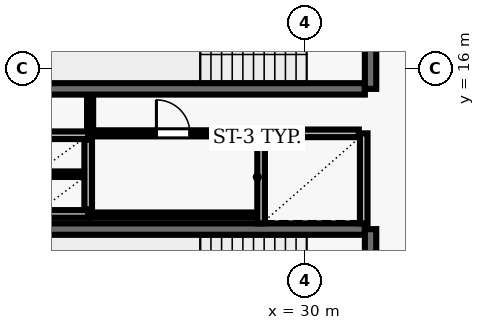
"""IFC4 building model, lengths in metres.
Left out: names, types, materials, properties, quantities, classifications, styles, units other than length and angle.
Written with IfcOpenShell. Run it as: python <this file> out.ifc"""

import sys

from ifc_helpers import new_model, si_unit, direction, frame, frame_2d, origin, place, context, subcontext, project, spatial, rectangle, extrude, element, fill, save


model = new_model("IFC4")
c1 = context("Model", 3, precision=1e-05, world=origin(), true_north=direction((0.0, 1.0)))
c2 = subcontext(c1, "Body", "Model", "MODEL_VIEW")
j1 = project(units=[si_unit("LENGTHUNIT", "METRE"), si_unit("PLANEANGLEUNIT", "RADIAN")], contexts=[c1])
p1 = place(None, origin())
s1 = spatial("IfcSite", under=j1, at=p1, CompositionType="ELEMENT")
p2 = place(p1, origin())
s2 = spatial("IfcBuilding", under=s1, at=p2, CompositionType="ELEMENT")
p3 = place(p2, frame((0.0, 0.0, 46.6)))
s3 = spatial("IfcBuildingStorey", under=s2, at=p3, CompositionType="ELEMENT", Elevation=46.6)
p4 = place(p3, frame((23.22, 15.47, 0.0), z_axis=(0.0, 0.0, 1.0), x_axis=(1.0, 0.0, 0.0)))
e1 = element("IfcWall", 1, at=p4, inside=s3, PredefinedType="SHEAR", context=c2, shape_type="SweptSolid", body=[
    extrude(rectangle(XDim=8.36, YDim=0.3, at=frame_2d((4.18, 0.0))), origin(), (0.0, 0.0, 1.0), 3.69),
])
p5 = place(p3, frame((31.73, 15.47, 0.0), z_axis=(0.0, 0.0, 1.0), x_axis=(0.0, 1.0, 0.0)))
e2 = element("IfcWall", 2, at=p5, inside=s3, PredefinedType="SHEAR", context=c2, shape_type="SweptSolid", body=[
    extrude(rectangle(XDim=3.51, YDim=0.3, at=frame_2d((1.755, 0.0))), origin(), (0.0, 0.0, 1.0), 3.69),
])
p6 = place(p5, frame((1.18, 0.0, 0.0)))
e3 = element("IfcOpeningElement", 3, at=p6, cuts=e2, PredefinedType="OPENING", context=c2, shape_type="SweptSolid", body=[
    extrude(rectangle(XDim=1.15, YDim=2.15, at=frame_2d((0.575, 1.075))), frame((0.0, 0.16, 0.0), z_axis=(0.0, -1.0, 0.0), x_axis=(1.0, 0.0, 0.0)), (0.0, 0.0, 1.0), 0.32),
])
p7 = place(p3, frame((31.58, 11.78, 0.0), z_axis=(0.0, 0.0, 1.0), x_axis=(-1.0, 0.0, 0.0)))
e4 = element("IfcWall", 4, at=p7, inside=s3, PredefinedType="SHEAR", context=c2, shape_type="SweptSolid", body=[
    extrude(rectangle(XDim=8.36, YDim=0.3, at=frame_2d((4.18, 0.0))), origin(), (0.0, 0.0, 1.0), 3.69),
])
p8 = place(p3, frame((31.73, 8.27, 0.0), z_axis=(0.0, 0.0, 1.0), x_axis=(0.0, 1.0, 0.0)))
e5 = element("IfcWall", 5, at=p8, inside=s3, PredefinedType="SHEAR", context=c2, shape_type="SweptSolid", body=[
    extrude(rectangle(XDim=3.51, YDim=0.3, at=frame_2d((1.755, 0.0))), origin(), (0.0, 0.0, 1.0), 3.69),
])
p9 = place(p8, frame((1.18, 0.0, 0.0)))
e6 = element("IfcOpeningElement", 6, at=p9, cuts=e5, PredefinedType="OPENING", context=c2, shape_type="SweptSolid", body=[
    extrude(rectangle(XDim=1.15, YDim=2.15, at=frame_2d((0.575, 1.075))), frame((0.0, 0.16, 0.0), z_axis=(0.0, -1.0, 0.0), x_axis=(1.0, 0.0, 0.0)), (0.0, 0.0, 1.0), 0.32),
])
for number, where, z_axis, x_axis in (
    (7, (28.85, 14.3, 0.0), (0.0, 0.0, 1.0), (0.0, -1.0, 0.0)),
    (8, (31.55, 11.93, 0.0), (0.0, 0.0, 1.0), (0.0, 1.0, 0.0)),
):
    element("IfcWall", number, at=place(p3, frame(where, z_axis=z_axis, x_axis=x_axis)), inside=s3, PredefinedType="SOLIDWALL", context=c2, shape_type="SweptSolid", body=[
        extrude(rectangle(XDim=2.37, YDim=0.2, at=frame_2d((1.185, 0.0))), origin(), (0.0, 0.0, 1.0), 3.69),
    ])
p10 = place(p3, frame((31.42, 14.3, 0.0), z_axis=(0.0, 0.0, 1.0), x_axis=(-1.0, 0.0, 0.0)))
e9 = element("IfcWall", 9, at=p10, inside=s3, PredefinedType="SOLIDWALL", context=c2, shape_type="SweptSolid", body=[
    extrude(rectangle(XDim=2.44, YDim=0.2, at=frame_2d((1.22, 0.0))), origin(), (0.0, 0.0, 1.0), 3.69),
])
for number, where, z_axis, x_axis in (
    (10, (22.9, 14.25, 0.0), (0.0, 0.0, 1.0), (1.0, 0.0, 0.0)),
    (11, (22.9, 12.18, 0.0), (0.0, 0.0, 1.0), (1.0, 0.0, 0.0)),
):
    element("IfcWall", number, at=place(p3, frame(where, z_axis=z_axis, x_axis=x_axis)), inside=s3, PredefinedType="SOLIDWALL", context=c2, shape_type="SweptSolid", body=[
        extrude(rectangle(XDim=1.4, YDim=0.2, at=frame_2d((0.7, 0.0))), origin(), (0.0, 0.0, 1.0), 3.69),
    ])
p11 = place(p3, frame((24.3, 12.3, 0.0), z_axis=(0.0, 0.0, 1.0), x_axis=(0.0, 1.0, 0.0)))
e12 = element("IfcWall", 12, at=p11, inside=s3, PredefinedType="SOLIDWALL", context=c2, shape_type="SweptSolid", body=[
    extrude(rectangle(XDim=1.83, YDim=0.2, at=frame_2d((0.915, 0.0))), origin(), (0.0, 0.0, 1.0), 3.69),
])
p12 = place(p3, frame((23.01, 13.225, 0.0), z_axis=(0.0, 0.0, 1.0), x_axis=(1.0, 0.0, 0.0)))
e13 = element("IfcWall", 13, at=p12, inside=s3, PredefinedType="PARTITIONING", context=c2, shape_type="SweptSolid", body=[
    extrude(rectangle(XDim=1.18, YDim=0.145, at=frame_2d((0.59, 0.0))), origin(), (0.0, 0.0, 1.0), 3.69),
])
p13 = place(p3, frame((24.35, 12.15, 0.0), z_axis=(0.0, 0.0, 1.0), x_axis=(1.0, 0.0, 0.0)))
e14 = element("IfcWall", 14, at=p13, inside=s3, PredefinedType="PARTITIONING", context=c2, shape_type="SweptSolid", body=[
    extrude(rectangle(XDim=4.37, YDim=0.135, at=frame_2d((2.185, 0.0))), origin(), (0.0, 0.0, 1.0), 3.69),
])
p14 = place(p3, frame((24.35, 14.3, 0.0), z_axis=(0.0, 0.0, 1.0), x_axis=(1.0, 0.0, 0.0)))
e15 = element("IfcWall", 15, at=p14, inside=s3, PredefinedType="PARTITIONING", context=c2, shape_type="SweptSolid", body=[
    extrude(rectangle(XDim=4.37, YDim=0.16, at=frame_2d((2.185, 0.0))), origin(), (0.0, 0.0, 1.0), 3.69),
])
p15 = place(p14, frame((1.745, 0.0, 0.0)))
e16 = element("IfcOpeningElement", 16, at=p15, cuts=e15, PredefinedType="OPENING", context=c2, shape_type="SweptSolid", body=[
    extrude(rectangle(XDim=0.88, YDim=2.1, at=frame_2d((0.44, 1.05))), frame((0.0, 0.09, 0.0), z_axis=(0.0, -1.0, 0.0), x_axis=(1.0, 0.0, 0.0)), (0.0, 0.0, 1.0), 0.18),
])
p16 = place(p3, frame((24.35, 15.29, 0.0), z_axis=(0.0, 0.0, 1.0), x_axis=(0.0, -1.0, 0.0)))
e17 = element("IfcWall", 17, at=p16, inside=s3, PredefinedType="PARTITIONING", context=c2, shape_type="SweptSolid", body=[
    extrude(rectangle(XDim=0.915, YDim=0.16, at=frame_2d((0.458, 0.0))), origin(), (0.0, 0.0, 1.0), 3.69),
])
p17 = place(p15, origin())
e18 = element("IfcDoor", 18, at=p17, inside=s3, OperationType="SINGLE_SWING_LEFT", PredefinedType="DOOR", context=c2, shape_type="SweptSolid", body=[
    extrude(rectangle(XDim=0.88, YDim=2.1, at=frame_2d((0.44, 1.05))), frame((0.0, 0.025, 0.0), z_axis=(0.0, -1.0, 0.0), x_axis=(1.0, 0.0, 0.0)), (0.0, 0.0, 1.0), 0.05),
])
fill(e16, e18)
save(model, sys.argv[1])
